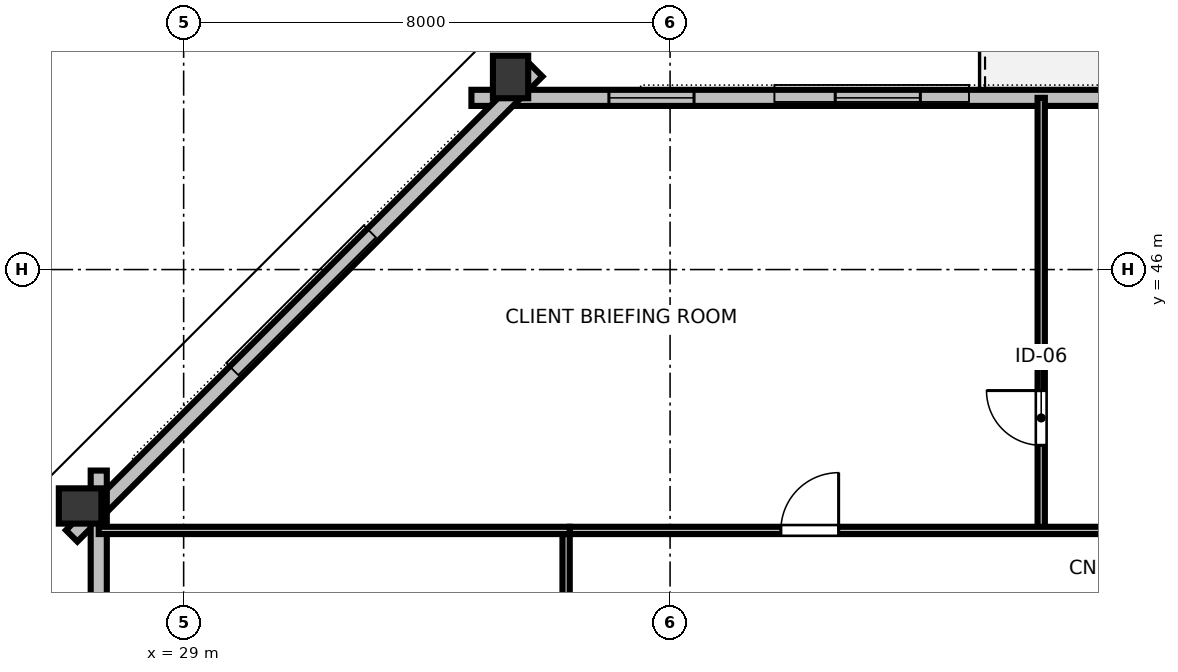
"""IFC4 building model, lengths in metres.
Left out: names, types, materials, properties, quantities, classifications, styles, units other than length and angle.
Written with IfcOpenShell. Run it as: python <this file> out.ifc"""

import sys

from ifc_helpers import new_model, si_unit, direction, frame, frame_2d, origin, origin_2d, place, context, subcontext, project, spatial, rectangle, hollow_rectangle, extrude, element, fill, save


model = new_model("IFC4")
c1 = context("Model", 3, precision=1e-05, world=origin(), true_north=direction((0.0, 1.0)))
c2 = subcontext(c1, "Body", "Model", "MODEL_VIEW")
j1 = project(units=[si_unit("LENGTHUNIT", "METRE"), si_unit("PLANEANGLEUNIT", "RADIAN")], contexts=[c1])
p1 = place(None, origin())
s1 = spatial("IfcSite", under=j1, at=p1, CompositionType="ELEMENT")
p2 = place(p1, origin())
s2 = spatial("IfcBuilding", under=s1, at=p2, CompositionType="ELEMENT")
p3 = place(p2, frame((0.0, 0.0, 253.8)))
s3 = spatial("IfcBuildingStorey", under=s2, at=p3, CompositionType="ELEMENT", Elevation=253.8)
for number, where, z_axis, x_axis in (
    (1, (34.376, 49.167, 0.0), (0.0, 0.0, 1.0), (1.0, 0.0, 0.0)),
    (2, (27.297, 42.112, 0.0), (0.0, 0.0, 1.0), (0.0, 1.0, 0.0)),
):
    element("IfcColumn", number, at=place(p3, frame(where, z_axis=z_axis, x_axis=x_axis)), inside=s3, PredefinedType="COLUMN", context=c2, shape_type="SweptSolid", body=[
        extrude(hollow_rectangle(XDim=0.58, YDim=0.7, WallThickness=0.032, at=origin_2d()), origin(), (0.0, 0.0, 1.0), 3.373),
    ])
p4 = place(p3, frame((58.267, 48.823, 0.0), z_axis=(0.0, 0.0, 1.0), x_axis=(-1.0, 0.0, 0.0)))
e3 = element("IfcWall", 3, at=p4, inside=s3, PredefinedType="STANDARD", context=c2, shape_type="SweptSolid", body=[
    extrude(rectangle(XDim=24.535, YDim=0.265, at=frame_2d((12.267, 0.0))), origin(), (0.0, 0.0, 1.0), 2.832),
])
p5 = place(p4, frame((8.587, 0.0, 0.0)))
e4 = element("IfcOpeningElement", 4, at=p5, cuts=e3, PredefinedType="OPENING", context=c2, shape_type="SweptSolid", body=[
    extrude(rectangle(XDim=1.4, YDim=2.15, at=frame_2d((0.7, 1.075))), frame((0.0, 0.142, 0.0), z_axis=(0.0, -1.0, 0.0), x_axis=(1.0, 0.0, 0.0)), (0.0, 0.0, 1.0), 0.285),
])
p6 = place(p4, frame((2.261, 0.0, 0.85)))
e5 = element("IfcOpeningElement", 5, at=p6, cuts=e3, PredefinedType="OPENING", context=c2, shape_type="SweptSolid", body=[
    extrude(rectangle(XDim=1.4, YDim=1.2, at=frame_2d((0.7, 0.6))), frame((0.0, 0.142, 0.0), z_axis=(0.0, -1.0, 0.0), x_axis=(1.0, 0.0, 0.0)), (0.0, 0.0, 1.0), 0.285),
])
p7 = place(p4, frame((5.984, 0.0, 0.85)))
e6 = element("IfcOpeningElement", 6, at=p7, cuts=e3, PredefinedType="OPENING", context=c2, shape_type="SweptSolid", body=[
    extrude(rectangle(XDim=1.4, YDim=1.2, at=frame_2d((0.7, 0.6))), frame((0.0, 0.142, 0.0), z_axis=(0.0, -1.0, 0.0), x_axis=(1.0, 0.0, 0.0)), (0.0, 0.0, 1.0), 0.285),
])
p8 = place(p4, frame((17.151, 0.0, 0.85)))
e7 = element("IfcOpeningElement", 7, at=p8, cuts=e3, PredefinedType="OPENING", context=c2, shape_type="SweptSolid", body=[
    extrude(rectangle(XDim=1.4, YDim=1.2, at=frame_2d((0.7, 0.6))), frame((0.0, 0.142, 0.0), z_axis=(0.0, -1.0, 0.0), x_axis=(1.0, 0.0, 0.0)), (0.0, 0.0, 1.0), 0.285),
])
p9 = place(p4, frame((20.873, 0.0, 0.85)))
e8 = element("IfcOpeningElement", 8, at=p9, cuts=e3, PredefinedType="OPENING", context=c2, shape_type="SweptSolid", body=[
    extrude(rectangle(XDim=1.4, YDim=1.2, at=frame_2d((0.7, 0.6))), frame((0.0, 0.142, 0.0), z_axis=(0.0, -1.0, 0.0), x_axis=(1.0, 0.0, 0.0)), (0.0, 0.0, 1.0), 0.285),
])
p10 = place(p3, frame((34.807, 49.269, 0.0), z_axis=(0.0, 0.0, 1.0), x_axis=(-0.707106781187, -0.707106781187, 0.0)))
e9 = element("IfcWall", 9, at=p10, inside=s3, PredefinedType="STANDARD", context=c2, shape_type="SweptSolid", body=[
    extrude(rectangle(XDim=10.816, YDim=0.265, at=frame_2d((5.408, 0.0))), origin(), (0.0, 0.0, 1.0), 2.832),
])
p11 = place(p3, frame((27.604, 42.695, 0.0), z_axis=(0.0, 0.0, 1.0), x_axis=(0.0, -1.0, 0.0)))
e10 = element("IfcWall", 10, at=p11, inside=s3, PredefinedType="STANDARD", context=c2, shape_type="SweptSolid", body=[
    extrude(rectangle(XDim=21.389, YDim=0.265, at=frame_2d((10.695, 0.0))), origin(), (0.0, 0.0, 1.0), 2.832),
])
p12 = place(p11, frame((2.319, 0.0, 0.85)))
e11 = element("IfcOpeningElement", 11, at=p12, cuts=e10, PredefinedType="OPENING", context=c2, shape_type="SweptSolid", body=[
    extrude(rectangle(XDim=1.4, YDim=1.2, at=frame_2d((0.7, 0.6))), frame((0.0, 0.142, 0.0), z_axis=(0.0, -1.0, 0.0), x_axis=(1.0, 0.0, 0.0)), (0.0, 0.0, 1.0), 0.285),
])
p13 = place(p11, frame((6.157, 0.0, 0.85)))
e12 = element("IfcOpeningElement", 12, at=p13, cuts=e10, PredefinedType="OPENING", context=c2, shape_type="SweptSolid", body=[
    extrude(rectangle(XDim=1.4, YDim=1.2, at=frame_2d((0.7, 0.6))), frame((0.0, 0.142, 0.0), z_axis=(0.0, -1.0, 0.0), x_axis=(1.0, 0.0, 0.0)), (0.0, 0.0, 1.0), 0.285),
])
p14 = place(p11, frame((13.832, 0.0, 0.85)))
e13 = element("IfcOpeningElement", 13, at=p14, cuts=e10, PredefinedType="OPENING", context=c2, shape_type="SweptSolid", body=[
    extrude(rectangle(XDim=1.4, YDim=1.2, at=frame_2d((0.7, 0.6))), frame((0.0, 0.142, 0.0), z_axis=(0.0, -1.0, 0.0), x_axis=(1.0, 0.0, 0.0)), (0.0, 0.0, 1.0), 0.285),
])
p15 = place(p11, frame((17.67, 0.0, 0.85)))
e14 = element("IfcOpeningElement", 14, at=p15, cuts=e10, PredefinedType="OPENING", context=c2, shape_type="SweptSolid", body=[
    extrude(rectangle(XDim=1.4, YDim=1.2, at=frame_2d((0.7, 0.6))), frame((0.0, 0.142, 0.0), z_axis=(0.0, -1.0, 0.0), x_axis=(1.0, 0.0, 0.0)), (0.0, 0.0, 1.0), 0.285),
])
p16 = place(p3, frame((43.104, 41.71, 0.0), z_axis=(0.0, 0.0, 1.0), x_axis=(0.0, 1.0, 0.0)))
e15 = element("IfcWall", 15, at=p16, inside=s3, PredefinedType="PARTITIONING", context=c2, shape_type="SweptSolid", body=[
    extrude(rectangle(XDim=7.114, YDim=0.12, at=frame_2d((3.557, 0.0))), origin(), (0.0, 0.0, 1.0), 2.655),
])
p17 = place(p16, frame((1.4, 0.0, 0.0)))
e16 = element("IfcOpeningElement", 16, at=p17, cuts=e15, PredefinedType="OPENING", context=c2, shape_type="SweptSolid", body=[
    extrude(rectangle(XDim=0.9, YDim=2.15, at=frame_2d((0.45, 1.075))), frame((0.0, 0.07, 0.0), z_axis=(0.0, -1.0, 0.0), x_axis=(1.0, 0.0, 0.0)), (0.0, 0.0, 1.0), 0.14),
])
p18 = place(p3, frame((35.35, 41.71, 0.0), z_axis=(0.0, 0.0, 1.0), x_axis=(1.0, 0.0, 0.0)))
e17 = element("IfcWall", 17, at=p18, inside=s3, PredefinedType="PARTITIONING", context=c2, shape_type="SweptSolid", body=[
    extrude(rectangle(XDim=21.3, YDim=0.12, at=frame_2d((10.65, 0.0))), origin(), (0.0, 0.0, 1.0), 2.655),
])
p19 = place(p18, frame((3.472, 0.0, 0.0)))
e18 = element("IfcOpeningElement", 18, at=p19, cuts=e17, PredefinedType="OPENING", context=c2, shape_type="SweptSolid", body=[
    extrude(rectangle(XDim=0.95, YDim=2.15, at=frame_2d((0.475, 1.075))), frame((0.0, 0.07, 0.0), z_axis=(0.0, -1.0, 0.0), x_axis=(1.0, 0.0, 0.0)), (0.0, 0.0, 1.0), 0.14),
])
p20 = place(p18, frame((12.975, 0.0, 0.0)))
e19 = element("IfcOpeningElement", 19, at=p20, cuts=e17, PredefinedType="OPENING", context=c2, shape_type="SweptSolid", body=[
    extrude(rectangle(XDim=0.95, YDim=2.15, at=frame_2d((0.475, 1.075))), frame((0.0, 0.07, 0.0), z_axis=(0.0, -1.0, 0.0), x_axis=(1.0, 0.0, 0.0)), (0.0, 0.0, 1.0), 0.14),
])
p21 = place(p18, frame((17.735, 0.0, 0.0)))
e20 = element("IfcOpeningElement", 20, at=p21, cuts=e17, PredefinedType="OPENING", context=c2, shape_type="SweptSolid", body=[
    extrude(rectangle(XDim=0.95, YDim=2.15, at=frame_2d((0.475, 1.075))), frame((0.0, 0.07, 0.0), z_axis=(0.0, -1.0, 0.0), x_axis=(1.0, 0.0, 0.0)), (0.0, 0.0, 1.0), 0.14),
])
p22 = place(p3, frame((35.29, 22.35, 0.0), z_axis=(0.0, 0.0, 1.0), x_axis=(0.0, 1.0, 0.0)))
e21 = element("IfcWall", 21, at=p22, inside=s3, PredefinedType="PARTITIONING", context=c2, shape_type="SweptSolid", body=[
    extrude(rectangle(XDim=19.3, YDim=0.12, at=frame_2d((9.65, 0.0))), origin(), (0.0, 0.0, 1.0), 2.655),
])
p23 = place(p22, frame((3.656, 0.0, 0.0)))
e22 = element("IfcOpeningElement", 22, at=p23, cuts=e21, PredefinedType="OPENING", context=c2, shape_type="SweptSolid", body=[
    extrude(rectangle(XDim=0.95, YDim=2.15, at=frame_2d((0.475, 1.075))), frame((0.0, 0.07, 0.0), z_axis=(0.0, -1.0, 0.0), x_axis=(1.0, 0.0, 0.0)), (0.0, 0.0, 1.0), 0.14),
])
p24 = place(p22, frame((13.106, 0.0, 0.0)))
e23 = element("IfcOpeningElement", 23, at=p24, cuts=e21, PredefinedType="OPENING", context=c2, shape_type="SweptSolid", body=[
    extrude(rectangle(XDim=0.95, YDim=2.15, at=frame_2d((0.475, 1.075))), frame((0.0, 0.07, 0.0), z_axis=(0.0, -1.0, 0.0), x_axis=(1.0, 0.0, 0.0)), (0.0, 0.0, 1.0), 0.14),
])
p25 = place(p3, frame((35.35, 41.71, 0.0), z_axis=(0.0, 0.0, 1.0), x_axis=(-1.0, 0.0, 0.0)))
e24 = element("IfcWall", 24, at=p25, inside=s3, PredefinedType="PARTITIONING", context=c2, shape_type="SweptSolid", body=[
    extrude(rectangle(XDim=7.747, YDim=0.12, at=frame_2d((3.873, 0.0))), origin(), (0.0, 0.0, 1.0), 2.655),
])
p26 = place(p8, origin())
e25 = element("IfcWindow", 25, at=p26, inside=s3, PartitioningType="SINGLE_PANEL", PredefinedType="WINDOW", context=c2, shape_type="SweptSolid", body=[
    extrude(rectangle(XDim=1.4, YDim=1.2, at=frame_2d((0.7, 0.6))), frame((0.0, 0.03, 0.0), z_axis=(0.0, -1.0, 0.0), x_axis=(1.0, 0.0, 0.0)), (0.0, 0.0, 1.0), 0.06),
])
fill(e7, e25)
p27 = place(p9, origin())
e26 = element("IfcWindow", 26, at=p27, inside=s3, PartitioningType="SINGLE_PANEL", PredefinedType="WINDOW", context=c2, shape_type="SweptSolid", body=[
    extrude(rectangle(XDim=1.4, YDim=1.2, at=frame_2d((0.7, 0.6))), frame((0.0, 0.03, 0.0), z_axis=(0.0, -1.0, 0.0), x_axis=(1.0, 0.0, 0.0)), (0.0, 0.0, 1.0), 0.06),
])
fill(e8, e26)
p28 = place(p17, origin())
e27 = element("IfcDoor", 27, at=p28, inside=s3, OperationType="SINGLE_SWING_RIGHT", PredefinedType="DOOR", context=c2, shape_type="SweptSolid", body=[
    extrude(rectangle(XDim=0.9, YDim=2.15, at=frame_2d((0.45, 1.075))), frame((0.0, 0.025, 0.0), z_axis=(0.0, -1.0, 0.0), x_axis=(1.0, 0.0, 0.0)), (0.0, 0.0, 1.0), 0.05),
])
fill(e16, e27)
p29 = place(p19, origin())
e28 = element("IfcDoor", 28, at=p29, inside=s3, OperationType="SINGLE_SWING_RIGHT", PredefinedType="DOOR", context=c2, shape_type="SweptSolid", body=[
    extrude(rectangle(XDim=0.95, YDim=2.15, at=frame_2d((0.475, 1.075))), frame((0.0, 0.025, 0.0), z_axis=(0.0, -1.0, 0.0), x_axis=(1.0, 0.0, 0.0)), (0.0, 0.0, 1.0), 0.05),
])
fill(e18, e28)
save(model, sys.argv[1])
